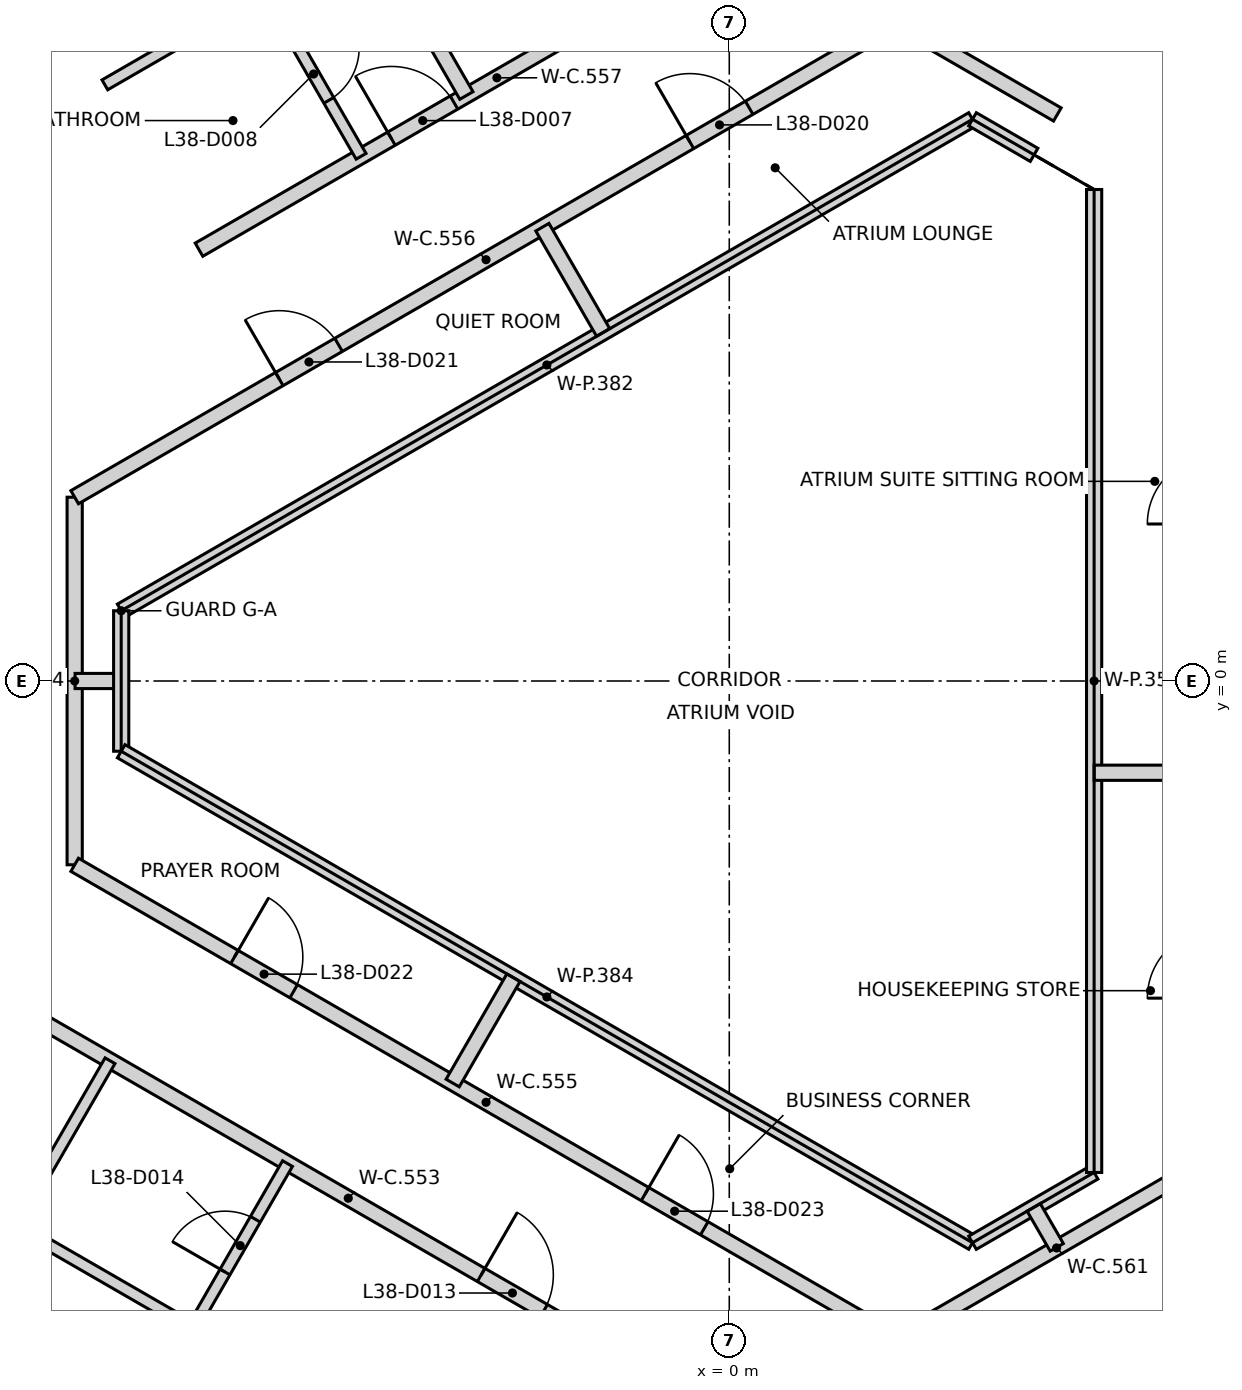
"""IFC4 building model, lengths in metres.
Left out: names, types, materials, properties, quantities, classifications, styles, units other than length and angle.
Written with IfcOpenShell. Run it as: python <this file> out.ifc"""

import sys

from ifc_helpers import new_model, si_unit, direction, frame, frame_2d, origin, place, context, subcontext, project, spatial, rectangle, extrude, element, fill, save


model = new_model("IFC4")
c1 = context("Model", 3, precision=1e-05, world=origin(), true_north=direction((0.0, 1.0)))
c2 = subcontext(c1, "Body", "Model", "MODEL_VIEW")
j1 = project(units=[si_unit("LENGTHUNIT", "METRE"), si_unit("PLANEANGLEUNIT", "RADIAN")], contexts=[c1])
p1 = place(None, origin())
s1 = spatial("IfcSite", under=j1, at=p1, CompositionType="ELEMENT")
p2 = place(p1, origin())
s2 = spatial("IfcBuilding", under=s1, at=p2, CompositionType="ELEMENT")
p3 = place(p2, frame((0.0, 0.0, 154.0)))
s3 = spatial("IfcBuildingStorey", under=s2, at=p3, CompositionType="ELEMENT", Elevation=154.0)
p4 = place(p3, frame((10.42, 6.498, 0.0), z_axis=(0.0, 0.0, 1.0), x_axis=(-0.866021906294, 0.500006057782, 0.0)))
e1 = element("IfcWall", 1, at=p4, inside=s3, PredefinedType="SHEAR", context=c2, shape_type="SweptSolid", body=[
    extrude(rectangle(XDim=11.55, YDim=0.25, at=frame_2d((5.775, 0.0))), origin(), (0.0, 0.0, 1.0), 3.2),
])
p5 = place(p4, frame((10.025, 0.0, 0.0)))
e2 = element("IfcOpeningElement", 2, at=p5, cuts=e1, PredefinedType="OPENING", context=c2, shape_type="SweptSolid", body=[
    extrude(rectangle(XDim=1.2, YDim=2.1, at=frame_2d((0.6, 1.05))), frame((0.0, 0.135, 0.0), z_axis=(0.0, -1.0, 0.0), x_axis=(1.0, 0.0, 0.0)), (0.0, 0.0, 1.0), 0.27),
])
p6 = place(p4, frame((8.725, 0.0, 0.0)))
e3 = element("IfcOpeningElement", 3, at=p6, cuts=e1, PredefinedType="OPENING", context=c2, shape_type="SweptSolid", body=[
    extrude(rectangle(XDim=1.2, YDim=2.1, at=frame_2d((0.6, 1.05))), frame((0.0, 0.135, 0.0), z_axis=(0.0, -1.0, 0.0), x_axis=(1.0, 0.0, 0.0)), (0.0, 0.0, 1.0), 0.27),
])
p7 = place(p3, frame((0.417, -12.273, 0.0), z_axis=(0.0, 0.0, 1.0), x_axis=(0.866021906294, 0.500006057782, 0.0)))
e4 = element("IfcWall", 4, at=p7, inside=s3, PredefinedType="SHEAR", context=c2, shape_type="SweptSolid", body=[
    extrude(rectangle(XDim=11.55, YDim=0.25, at=frame_2d((5.775, 0.0))), origin(), (0.0, 0.0, 1.0), 3.2),
])
p8 = place(p7, frame((10.025, 0.0, 0.0)))
e5 = element("IfcOpeningElement", 5, at=p8, cuts=e4, PredefinedType="OPENING", context=c2, shape_type="SweptSolid", body=[
    extrude(rectangle(XDim=1.2, YDim=2.1, at=frame_2d((0.6, 1.05))), frame((0.0, 0.135, 0.0), z_axis=(0.0, -1.0, 0.0), x_axis=(1.0, 0.0, 0.0)), (0.0, 0.0, 1.0), 0.27),
])
p9 = place(p7, frame((8.725, 0.0, 0.0)))
e6 = element("IfcOpeningElement", 6, at=p9, cuts=e4, PredefinedType="OPENING", context=c2, shape_type="SweptSolid", body=[
    extrude(rectangle(XDim=1.2, YDim=2.1, at=frame_2d((0.6, 1.05))), frame((0.0, 0.135, 0.0), z_axis=(0.0, -1.0, 0.0), x_axis=(1.0, 0.0, 0.0)), (0.0, 0.0, 1.0), 0.27),
])
p10 = place(p3, frame((-9.261, -4.351, 0.0), z_axis=(0.0, 0.0, 1.0), x_axis=(0.865985037707, -0.500069909581, 0.0)))
e7 = element("IfcWall", 7, at=p10, inside=s3, PredefinedType="PARTITIONING", context=c2, shape_type="SweptSolid", body=[
    extrude(rectangle(XDim=9.812, YDim=0.2, at=frame_2d((4.906, 0.0))), origin(), (0.0, 0.0, 1.0), 3.2),
])
p11 = place(p10, frame((6.925, 0.0, 0.0)))
e8 = element("IfcOpeningElement", 8, at=p11, cuts=e7, PredefinedType="OPENING", context=c2, shape_type="SweptSolid", body=[
    extrude(rectangle(XDim=0.95, YDim=2.1, at=frame_2d((0.475, 1.05))), frame((0.0, 0.11, 0.0), z_axis=(0.0, -1.0, 0.0), x_axis=(1.0, 0.0, 0.0)), (0.0, 0.0, 1.0), 0.22),
])
p12 = place(p3, frame((-8.612, -2.418, 0.0), z_axis=(0.0, 0.0, 1.0), x_axis=(0.0, 1.0, 0.0)))
e9 = element("IfcWall", 9, at=p12, inside=s3, PredefinedType="PARTITIONING", context=c2, shape_type="SweptSolid", body=[
    extrude(rectangle(XDim=4.836, YDim=0.2, at=frame_2d((2.418, 0.0))), origin(), (0.0, 0.0, 1.0), 2.3),
])
p13 = place(p3, frame((-8.612, -2.418, 0.0), z_axis=(0.0, 0.0, 1.0), x_axis=(0.866023916678, -0.500002575735, 0.0)))
e10 = element("IfcWall", 10, at=p13, inside=s3, PredefinedType="PARTITIONING", context=c2, shape_type="SweptSolid", body=[
    extrude(rectangle(XDim=12.499, YDim=0.2, at=frame_2d((6.249, 0.0))), origin(), (0.0, 0.0, 1.0), 3.2),
])
p14 = place(p13, frame((2.427, 0.0, 0.0)))
e11 = element("IfcOpeningElement", 11, at=p14, cuts=e10, PredefinedType="OPENING", context=c2, shape_type="SweptSolid", body=[
    extrude(rectangle(XDim=0.9, YDim=2.1, at=frame_2d((0.45, 1.05))), frame((0.0, 0.11, 0.0), z_axis=(0.0, -1.0, 0.0), x_axis=(1.0, 0.0, 0.0)), (0.0, 0.0, 1.0), 0.22),
])
p15 = place(p13, frame((8.665, 0.0, 0.0)))
e12 = element("IfcOpeningElement", 12, at=p15, cuts=e10, PredefinedType="OPENING", context=c2, shape_type="SweptSolid", body=[
    extrude(rectangle(XDim=0.9, YDim=2.1, at=frame_2d((0.45, 1.05))), frame((0.0, 0.11, 0.0), z_axis=(0.0, -1.0, 0.0), x_axis=(1.0, 0.0, 0.0)), (0.0, 0.0, 1.0), 0.22),
])
p16 = place(p3, frame((-8.612, 2.418, 0.0), z_axis=(0.0, 0.0, 1.0), x_axis=(0.866019033094, 0.500011034197, 0.0)))
e13 = element("IfcWall", 13, at=p16, inside=s3, PredefinedType="PARTITIONING", context=c2, shape_type="SweptSolid", body=[
    extrude(rectangle(XDim=12.498, YDim=0.2, at=frame_2d((6.249, 0.0))), origin(), (0.0, 0.0, 1.0), 3.2),
])
p17 = place(p16, frame((9.346, 0.0, 0.0)))
e14 = element("IfcOpeningElement", 14, at=p17, cuts=e13, PredefinedType="OPENING", context=c2, shape_type="SweptSolid", body=[
    extrude(rectangle(XDim=0.9, YDim=2.1, at=frame_2d((0.45, 1.05))), frame((0.0, 0.11, 0.0), z_axis=(0.0, -1.0, 0.0), x_axis=(1.0, 0.0, 0.0)), (0.0, 0.0, 1.0), 0.22),
])
p18 = place(p16, frame((3.109, 0.0, 0.0)))
e15 = element("IfcOpeningElement", 15, at=p18, cuts=e13, PredefinedType="OPENING", context=c2, shape_type="SweptSolid", body=[
    extrude(rectangle(XDim=0.9, YDim=2.1, at=frame_2d((0.45, 1.05))), frame((0.0, 0.11, 0.0), z_axis=(0.0, -1.0, 0.0), x_axis=(1.0, 0.0, 0.0)), (0.0, 0.0, 1.0), 0.22),
])
p19 = place(p3, frame((-6.976, 5.674, 0.0), z_axis=(0.0, 0.0, 1.0), x_axis=(0.8661469583, 0.499789402276, 0.0)))
e16 = element("IfcWall", 16, at=p19, inside=s3, PredefinedType="PARTITIONING", context=c2, shape_type="SweptSolid", body=[
    extrude(rectangle(XDim=9.05, YDim=0.2, at=frame_2d((4.525, 0.0))), origin(), (0.0, 0.0, 1.0), 3.2),
])
p20 = place(p19, frame((7.852, 0.0, 0.0)))
e17 = element("IfcOpeningElement", 17, at=p20, cuts=e16, PredefinedType="OPENING", context=c2, shape_type="SweptSolid", body=[
    extrude(rectangle(XDim=0.95, YDim=2.1, at=frame_2d((0.475, 1.05))), frame((0.0, 0.11, 0.0), z_axis=(0.0, -1.0, 0.0), x_axis=(1.0, 0.0, 0.0)), (0.0, 0.0, 1.0), 0.22),
])
p21 = place(p19, frame((2.923, 0.0, 0.0)))
e18 = element("IfcOpeningElement", 18, at=p21, cuts=e16, PredefinedType="OPENING", context=c2, shape_type="SweptSolid", body=[
    extrude(rectangle(XDim=0.95, YDim=2.1, at=frame_2d((0.475, 1.05))), frame((0.0, 0.11, 0.0), z_axis=(0.0, -1.0, 0.0), x_axis=(1.0, 0.0, 0.0)), (0.0, 0.0, 1.0), 0.22),
])
p22 = place(p3, frame((2.212, -8.667, 0.0), z_axis=(0.0, 0.0, 1.0), x_axis=(0.866053587187, 0.499951181737, 0.0)))
e19 = element("IfcWall", 19, at=p22, inside=s3, PredefinedType="PARTITIONING", context=c2, shape_type="SweptSolid", body=[
    extrude(rectangle(XDim=4.835, YDim=0.2, at=frame_2d((2.418, 0.0))), origin(), (0.0, 0.0, 1.0), 2.3),
])
p23 = place(p3, frame((2.213, 8.668, 0.0), z_axis=(0.0, 0.0, 1.0), x_axis=(0.866001461921, -0.500041466232, 0.0)))
e20 = element("IfcWall", 20, at=p23, inside=s3, PredefinedType="PARTITIONING", context=c2, shape_type="SweptSolid", body=[
    extrude(rectangle(XDim=2.429, YDim=0.2, at=frame_2d((1.214, 0.0))), origin(), (0.0, 0.0, 1.0), 2.3),
])
p24 = place(p3, frame((-10.071, 19.158, 0.0), z_axis=(0.0, 0.0, 1.0), x_axis=(0.499905140254, -0.866080164158, 0.0)))
e21 = element("IfcWall", 21, at=p24, inside=s3, PredefinedType="PARTITIONING", context=c2, shape_type="SweptSolid", body=[
    extrude(rectangle(XDim=13.227, YDim=0.2, at=frame_2d((6.613, 0.0))), origin(), (0.0, 0.0, 1.0), 2.3),
])
p25 = place(p3, frame((-8.607, 0.0, 0.0), z_axis=(0.0, 0.0, 1.0), x_axis=(1.0, 0.0, 0.0)))
e22 = element("IfcWall", 22, at=p25, inside=s3, PredefinedType="PARTITIONING", context=c2, shape_type="SweptSolid", body=[
    extrude(rectangle(XDim=0.607, YDim=0.2, at=frame_2d((0.303, 0.0))), origin(), (0.0, 0.0, 1.0), 2.3),
])
p26 = place(p3, frame((-8.0, 0.925, 0.0), z_axis=(0.0, 0.0, 1.0), x_axis=(0.866075250037, 0.499913653818, 0.0)))
e23 = element("IfcWall", 23, at=p26, inside=s3, PredefinedType="PARTITIONING", context=c2, shape_type="SweptSolid", body=[
    extrude(rectangle(XDim=12.932, YDim=0.2, at=frame_2d((6.466, 0.0))), origin(), (0.0, 0.0, 1.0), 2.3),
])
p27 = place(p3, frame((-8.0, -0.924, 0.0), z_axis=(0.0, 0.0, 1.0), x_axis=(0.0, 1.0, 0.0)))
e24 = element("IfcWall", 24, at=p27, inside=s3, PredefinedType="PARTITIONING", context=c2, shape_type="SweptSolid", body=[
    extrude(rectangle(XDim=1.848, YDim=0.2, at=frame_2d((0.924, 0.0))), origin(), (0.0, 0.0, 1.0), 2.3),
])
p28 = place(p3, frame((-8.0, -0.924, 0.0), z_axis=(0.0, 0.0, 1.0), x_axis=(0.866062358179, -0.499935987647, 0.0)))
e25 = element("IfcWall", 25, at=p28, inside=s3, PredefinedType="PARTITIONING", context=c2, shape_type="SweptSolid", body=[
    extrude(rectangle(XDim=12.932, YDim=0.2, at=frame_2d((6.466, 0.0))), origin(), (0.0, 0.0, 1.0), 2.3),
])
p29 = place(p3, frame((-3.639, -5.289, 0.0), z_axis=(0.0, 0.0, 1.0), x_axis=(0.49981490623, 0.866132241352, 0.0)))
e26 = element("IfcWall", 26, at=p29, inside=s3, PredefinedType="PARTITIONING", context=c2, shape_type="SweptSolid", body=[
    extrude(rectangle(XDim=1.6, YDim=0.2, at=frame_2d((0.8, 0.0))), origin(), (0.0, 0.0, 1.0), 2.3),
])
p30 = place(p3, frame((-2.459, 5.97, 0.0), z_axis=(0.0, 0.0, 1.0), x_axis=(0.499898632315, -0.866083920535, 0.0)))
e27 = element("IfcWall", 27, at=p30, inside=s3, PredefinedType="PARTITIONING", context=c2, shape_type="SweptSolid", body=[
    extrude(rectangle(XDim=1.599, YDim=0.2, at=frame_2d((0.8, 0.0))), origin(), (0.0, 0.0, 1.0), 3.2),
])
p31 = place(p3, frame((3.2, 7.39, 0.0), z_axis=(0.0, 0.0, 1.0), x_axis=(0.865985641702, -0.500068863623, 0.0)))
e28 = element("IfcWall", 28, at=p31, inside=s3, PredefinedType="PARTITIONING", context=c2, shape_type="SweptSolid", body=[
    extrude(rectangle(XDim=0.935, YDim=0.2, at=frame_2d((0.468, 0.0))), origin(), (0.0, 0.0, 1.0), 2.3),
])
p32 = place(p3, frame((3.2, -7.39, 0.0), z_axis=(0.0, 0.0, 1.0), x_axis=(0.865875248522, 0.500259986404, 0.0)))
e29 = element("IfcWall", 29, at=p32, inside=s3, PredefinedType="PARTITIONING", context=c2, shape_type="SweptSolid", body=[
    extrude(rectangle(XDim=1.848, YDim=0.2, at=frame_2d((0.924, 0.0))), origin(), (0.0, 0.0, 1.0), 2.3),
])
p33 = place(p3, frame((4.005, -6.925, 0.0), z_axis=(0.0, 0.0, 1.0), x_axis=(0.499942781752, -0.866058436235, 0.0)))
e30 = element("IfcWall", 30, at=p33, inside=s3, PredefinedType="PARTITIONING", context=c2, shape_type="SweptSolid", body=[
    extrude(rectangle(XDim=0.607, YDim=0.2, at=frame_2d((0.304, 0.0))), origin(), (0.0, 0.0, 1.0), 2.3),
])
p34 = place(p3, frame((4.8, -6.466, 0.0), z_axis=(0.0, 0.0, 1.0), x_axis=(0.0, 1.0, 0.0)))
e31 = element("IfcWall", 31, at=p34, inside=s3, PredefinedType="PARTITIONING", context=c2, shape_type="SweptSolid", body=[
    extrude(rectangle(XDim=12.932, YDim=0.2, at=frame_2d((6.466, 0.0))), origin(), (0.0, 0.0, 1.0), 2.3),
])
p35 = place(p3, frame((4.8, -1.207, 0.0), z_axis=(0.0, 0.0, 1.0), x_axis=(1.0, 0.0, 0.0)))
e32 = element("IfcWall", 32, at=p35, inside=s3, PredefinedType="PARTITIONING", context=c2, shape_type="SweptSolid", body=[
    extrude(rectangle(XDim=1.6, YDim=0.2, at=frame_2d((0.8, 0.0))), origin(), (0.0, 0.0, 1.0), 2.3),
])
p36 = place(p3, frame((-9.396, -7.159, 0.0), z_axis=(0.0, 0.0, 1.0), x_axis=(0.500091929049, 0.865972322018, 0.0)))
e33 = element("IfcWall", 33, at=p36, inside=s3, PredefinedType="PARTITIONING", context=c2, shape_type="SweptSolid", body=[
    extrude(rectangle(XDim=2.498, YDim=0.15, at=frame_2d((1.249, 0.0))), origin(), (0.0, 0.0, 1.0), 3.2),
])
p37 = place(p3, frame((-9.393, -7.164, 0.0), z_axis=(0.0, 0.0, 1.0), x_axis=(0.866098020528, -0.499874203012, 0.0)))
e34 = element("IfcWall", 34, at=p37, inside=s3, PredefinedType="PARTITIONING", context=c2, shape_type="SweptSolid", body=[
    extrude(rectangle(XDim=2.693, YDim=0.15, at=frame_2d((1.346, 0.0))), origin(), (0.0, 0.0, 1.0), 3.2),
])
p38 = place(p3, frame((-8.215, 7.843, 0.0), z_axis=(0.0, 0.0, 1.0), x_axis=(0.865983065851, 0.500073324283, 0.0)))
e35 = element("IfcWall", 35, at=p38, inside=s3, PredefinedType="PARTITIONING", context=c2, shape_type="SweptSolid", body=[
    extrude(rectangle(XDim=2.449, YDim=0.15, at=frame_2d((1.225, 0.0))), origin(), (0.0, 0.0, 1.0), 3.2),
])
p39 = place(p3, frame((-7.056, -8.507, 0.0), z_axis=(0.0, 0.0, 1.0), x_axis=(0.499397145068, 0.866373182582, 0.0)))
e36 = element("IfcWall", 36, at=p39, inside=s3, PredefinedType="PARTITIONING", context=c2, shape_type="SweptSolid", body=[
    extrude(rectangle(XDim=2.491, YDim=0.15, at=frame_2d((1.245, 0.0))), origin(), (0.0, 0.0, 1.0), 3.2),
])
p40 = place(p39, frame((0.845, 0.0, 0.0)))
e37 = element("IfcOpeningElement", 37, at=p40, cuts=e36, PredefinedType="OPENING", context=c2, shape_type="SweptSolid", body=[
    extrude(rectangle(XDim=0.8, YDim=2.1, at=frame_2d((0.4, 1.05))), frame((0.0, 0.085, 0.0), z_axis=(0.0, -1.0, 0.0), x_axis=(1.0, 0.0, 0.0)), (0.0, 0.0, 1.0), 0.17),
])
p41 = place(p3, frame((-6.094, 9.068, 0.0), z_axis=(0.0, 0.0, 1.0), x_axis=(0.500004234368, -0.866022959057, 0.0)))
e38 = element("IfcWall", 38, at=p41, inside=s3, PredefinedType="PARTITIONING", context=c2, shape_type="SweptSolid", body=[
    extrude(rectangle(XDim=2.5, YDim=0.15, at=frame_2d((1.25, 0.0))), origin(), (0.0, 0.0, 1.0), 3.2),
])
p42 = place(p41, frame((0.85, 0.0, 0.0)))
e39 = element("IfcOpeningElement", 39, at=p42, cuts=e38, PredefinedType="OPENING", context=c2, shape_type="SweptSolid", body=[
    extrude(rectangle(XDim=0.8, YDim=2.1, at=frame_2d((0.4, 1.05))), frame((0.0, 0.085, 0.0), z_axis=(0.0, -1.0, 0.0), x_axis=(1.0, 0.0, 0.0)), (0.0, 0.0, 1.0), 0.17),
])
p43 = place(p21, origin())
e40 = element("IfcDoor", 40, at=p43, inside=s3, OperationType="SINGLE_SWING_LEFT", PredefinedType="DOOR", context=c2, shape_type="SweptSolid", body=[
    extrude(rectangle(XDim=0.95, YDim=2.1, at=frame_2d((0.475, 1.05))), frame((0.0, 0.025, 0.0), z_axis=(0.0, -1.0, 0.0), x_axis=(1.0, 0.0, 0.0)), (0.0, 0.0, 1.0), 0.05),
])
fill(e18, e40)
p44 = place(p42, frame((0.8, 0.0, 0.0), z_axis=(0.0, 0.0, 1.0), x_axis=(-1.0, 0.0, 0.0)))
e41 = element("IfcDoor", 41, at=p44, inside=s3, OperationType="SINGLE_SWING_LEFT", PredefinedType="DOOR", context=c2, shape_type="SweptSolid", body=[
    extrude(rectangle(XDim=0.8, YDim=2.1, at=frame_2d((0.4, 1.05))), frame((0.0, 0.025, 0.0), z_axis=(0.0, -1.0, 0.0), x_axis=(1.0, 0.0, 0.0)), (0.0, 0.0, 1.0), 0.05),
])
fill(e39, e41)
p45 = place(p11, frame((0.95, 0.0, 0.0), z_axis=(0.0, 0.0, 1.0), x_axis=(-1.0, 0.0, 0.0)))
e42 = element("IfcDoor", 42, at=p45, inside=s3, OperationType="SINGLE_SWING_LEFT", PredefinedType="DOOR", context=c2, shape_type="SweptSolid", body=[
    extrude(rectangle(XDim=0.95, YDim=2.1, at=frame_2d((0.475, 1.05))), frame((0.0, 0.025, 0.0), z_axis=(0.0, -1.0, 0.0), x_axis=(1.0, 0.0, 0.0)), (0.0, 0.0, 1.0), 0.05),
])
fill(e8, e42)
p46 = place(p40, origin())
e43 = element("IfcDoor", 43, at=p46, inside=s3, OperationType="SINGLE_SWING_LEFT", PredefinedType="DOOR", context=c2, shape_type="SweptSolid", body=[
    extrude(rectangle(XDim=0.8, YDim=2.1, at=frame_2d((0.4, 1.05))), frame((0.0, 0.025, 0.0), z_axis=(0.0, -1.0, 0.0), x_axis=(1.0, 0.0, 0.0)), (0.0, 0.0, 1.0), 0.05),
])
fill(e37, e43)
p47 = place(p17, frame((0.9, 0.0, 0.0), z_axis=(0.0, 0.0, 1.0), x_axis=(-1.0, 0.0, 0.0)))
e44 = element("IfcDoor", 44, at=p47, inside=s3, OperationType="SINGLE_SWING_LEFT", PredefinedType="DOOR", context=c2, shape_type="SweptSolid", body=[
    extrude(rectangle(XDim=0.9, YDim=2.1, at=frame_2d((0.45, 1.05))), frame((0.0, 0.025, 0.0), z_axis=(0.0, -1.0, 0.0), x_axis=(1.0, 0.0, 0.0)), (0.0, 0.0, 1.0), 0.05),
])
fill(e14, e44)
p48 = place(p18, frame((0.9, 0.0, 0.0), z_axis=(0.0, 0.0, 1.0), x_axis=(-1.0, 0.0, 0.0)))
e45 = element("IfcDoor", 45, at=p48, inside=s3, OperationType="SINGLE_SWING_LEFT", PredefinedType="DOOR", context=c2, shape_type="SweptSolid", body=[
    extrude(rectangle(XDim=0.9, YDim=2.1, at=frame_2d((0.45, 1.05))), frame((0.0, 0.025, 0.0), z_axis=(0.0, -1.0, 0.0), x_axis=(1.0, 0.0, 0.0)), (0.0, 0.0, 1.0), 0.05),
])
fill(e15, e45)
p49 = place(p14, origin())
e46 = element("IfcDoor", 46, at=p49, inside=s3, OperationType="SINGLE_SWING_LEFT", PredefinedType="DOOR", context=c2, shape_type="SweptSolid", body=[
    extrude(rectangle(XDim=0.9, YDim=2.1, at=frame_2d((0.45, 1.05))), frame((0.0, 0.025, 0.0), z_axis=(0.0, -1.0, 0.0), x_axis=(1.0, 0.0, 0.0)), (0.0, 0.0, 1.0), 0.05),
])
fill(e11, e46)
p50 = place(p15, origin())
e47 = element("IfcDoor", 47, at=p50, inside=s3, OperationType="SINGLE_SWING_LEFT", PredefinedType="DOOR", context=c2, shape_type="SweptSolid", body=[
    extrude(rectangle(XDim=0.9, YDim=2.1, at=frame_2d((0.45, 1.05))), frame((0.0, 0.025, 0.0), z_axis=(0.0, -1.0, 0.0), x_axis=(1.0, 0.0, 0.0)), (0.0, 0.0, 1.0), 0.05),
])
fill(e12, e47)
save(model, sys.argv[1])
